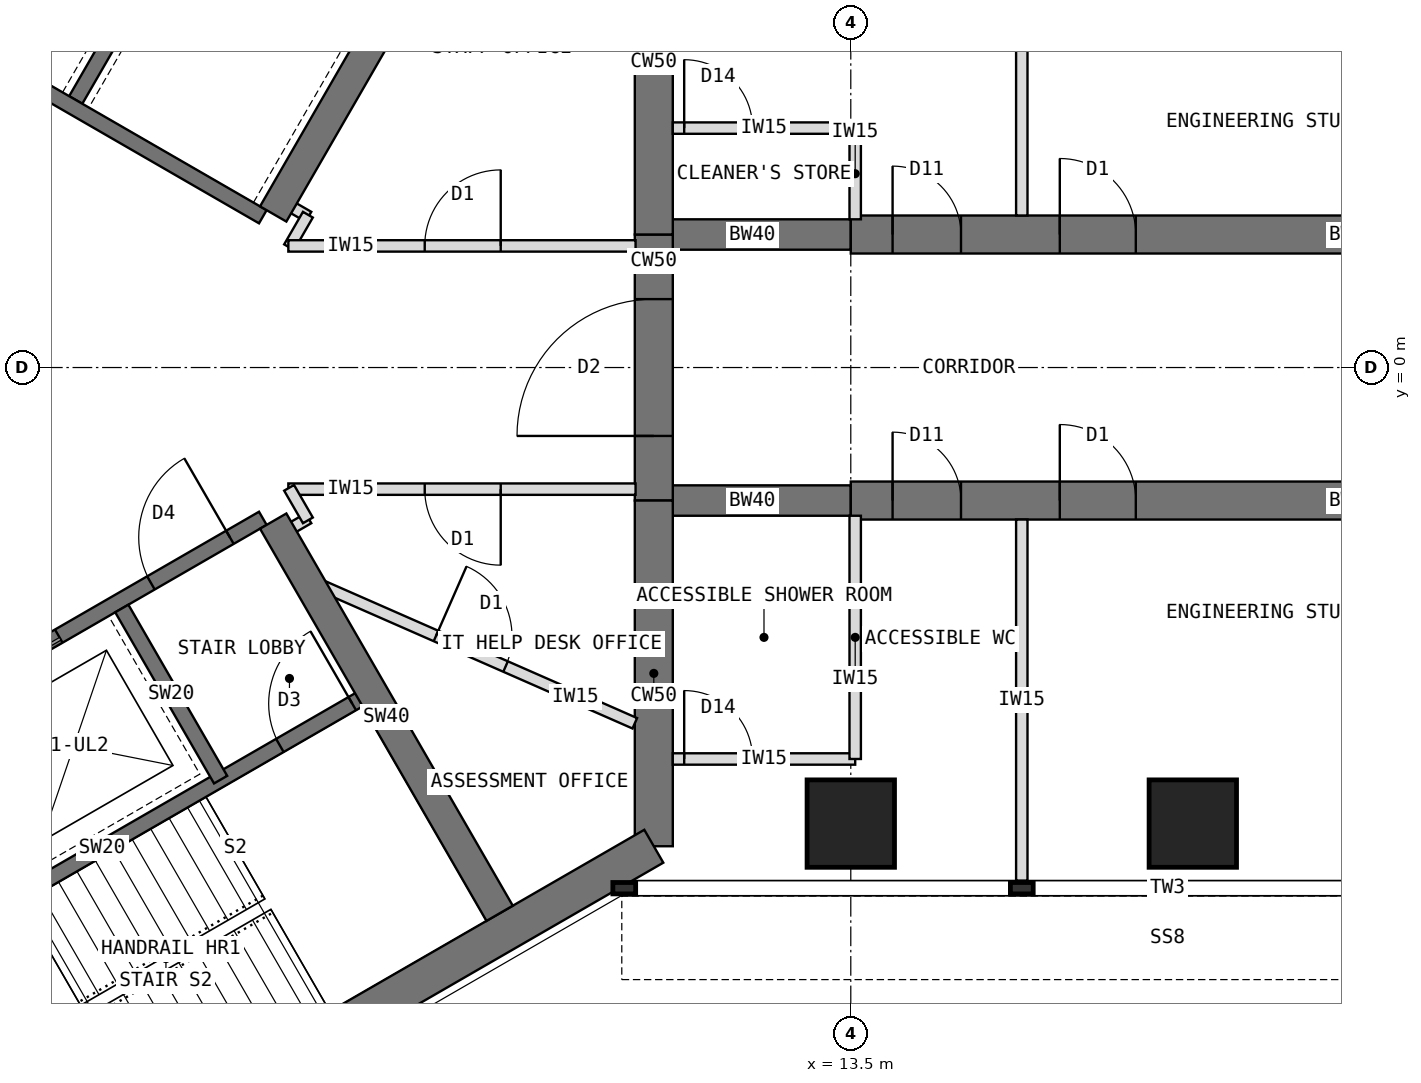
"""IFC4 building model, lengths in metres.
Left out: names, types, materials, properties, quantities, classifications, styles, units other than length and angle.
Written with IfcOpenShell. Run it as: python <this file> out.ifc"""

import sys

from ifc_helpers import new_model, si_unit, direction, frame, frame_2d, origin, origin_2d, place, context, subcontext, project, spatial, rectangle, extrude, element, fill, save


model = new_model("IFC4")
c1 = context("Model", 3, precision=1e-05, world=origin(), true_north=direction((0.0, 1.0)))
c2 = subcontext(c1, "Body", "Model", "MODEL_VIEW")
j1 = project(units=[si_unit("LENGTHUNIT", "METRE"), si_unit("PLANEANGLEUNIT", "RADIAN")], contexts=[c1])
p1 = place(None, origin())
s1 = spatial("IfcSite", under=j1, at=p1, CompositionType="ELEMENT")
p2 = place(p1, origin())
s2 = spatial("IfcBuilding", under=s1, at=p2, CompositionType="ELEMENT")
p3 = place(p2, frame((0.0, 0.0, 194.5)))
s3 = spatial("IfcBuildingStorey", under=s2, at=p3, CompositionType="ELEMENT", Elevation=194.5)
p4 = place(p3, frame((10.908, -6.298, 0.0), z_axis=(0.0, 0.0, 1.0), x_axis=(0.0, 1.0, 0.0)))
e1 = element("IfcWall", 1, at=p4, inside=s3, PredefinedType="SHEAR", context=c2, shape_type="SweptSolid", body=[
    extrude(rectangle(XDim=4.548, YDim=0.5, at=frame_2d((2.274, 0.0))), origin(), (0.0, 0.0, 1.0), 4.0),
])
p5 = place(p3, frame((10.908, -1.75, 0.0), z_axis=(0.0, 0.0, 1.0), x_axis=(0.0, 1.0, 0.0)))
e2 = element("IfcWall", 2, at=p5, inside=s3, PredefinedType="SHEAR", context=c2, shape_type="SweptSolid", body=[
    extrude(rectangle(XDim=3.5, YDim=0.5, at=frame_2d((1.75, 0.0))), origin(), (0.0, 0.0, 1.0), 4.0),
])
p6 = place(p5, frame((0.85, 0.0, 0.0)))
e3 = element("IfcOpeningElement", 3, at=p6, cuts=e2, PredefinedType="OPENING", context=c2, shape_type="SweptSolid", body=[
    extrude(rectangle(XDim=1.8, YDim=2.1, at=frame_2d((0.9, 1.05))), frame((0.0, 0.26, 0.0), z_axis=(0.0, -1.0, 0.0), x_axis=(1.0, 0.0, 0.0)), (0.0, 0.0, 1.0), 0.52),
])
p7 = place(p3, frame((10.908, 1.75, 0.0), z_axis=(0.0, 0.0, 1.0), x_axis=(0.0, 1.0, 0.0)))
e4 = element("IfcWall", 4, at=p7, inside=s3, PredefinedType="SHEAR", context=c2, shape_type="SweptSolid", body=[
    extrude(rectangle(XDim=4.548, YDim=0.5, at=frame_2d((2.274, 0.0))), origin(), (0.0, 0.0, 1.0), 4.0),
])
p8 = place(p3, frame((0.0, -12.596, 0.0), z_axis=(0.0, 0.0, 1.0), x_axis=(0.866021940709, 0.500005998175, 0.0)))
e5 = element("IfcWall", 5, at=p8, inside=s3, PredefinedType="SHEAR", context=c2, shape_type="SweptSolid", body=[
    extrude(rectangle(XDim=12.596, YDim=0.5, at=frame_2d((6.298, 0.0))), origin(), (0.0, 0.0, 1.0), 4.0),
])
p9 = place(p3, frame((10.908, 1.75, 0.0), z_axis=(0.0, 0.0, 1.0), x_axis=(1.0, 0.0, 0.0)))
e6 = element("IfcWall", 6, at=p9, inside=s3, PredefinedType="SHEAR", context=c2, shape_type="SweptSolid", body=[
    extrude(rectangle(XDim=2.592, YDim=0.4, at=frame_2d((1.296, 0.0))), origin(), (0.0, 0.0, 1.0), 4.0),
])
p10 = place(p3, frame((13.5, 1.75, 0.0), z_axis=(0.0, 0.0, 1.0), x_axis=(1.0, 0.0, 0.0)))
e7 = element("IfcWall", 7, at=p10, inside=s3, PredefinedType="SHEAR", context=c2, shape_type="SweptSolid", body=[
    extrude(rectangle(XDim=13.2, YDim=0.5, at=frame_2d((6.6, 0.0))), origin(), (0.0, 0.0, 1.0), 4.0),
])
p11 = place(p10, frame((0.55, 0.0, 0.0)))
e8 = element("IfcOpeningElement", 8, at=p11, cuts=e7, PredefinedType="OPENING", context=c2, shape_type="SweptSolid", body=[
    extrude(rectangle(XDim=0.9, YDim=2.1, at=frame_2d((0.45, 1.05))), frame((0.0, 0.26, 0.0), z_axis=(0.0, -1.0, 0.0), x_axis=(1.0, 0.0, 0.0)), (0.0, 0.0, 1.0), 0.52),
])
p12 = place(p10, frame((2.75, 0.0, 0.0)))
e9 = element("IfcOpeningElement", 9, at=p12, cuts=e7, PredefinedType="OPENING", context=c2, shape_type="SweptSolid", body=[
    extrude(rectangle(XDim=1.0, YDim=2.1, at=frame_2d((0.5, 1.05))), frame((0.0, 0.26, 0.0), z_axis=(0.0, -1.0, 0.0), x_axis=(1.0, 0.0, 0.0)), (0.0, 0.0, 1.0), 0.52),
])
p13 = place(p3, frame((10.908, -1.75, 0.0), z_axis=(0.0, 0.0, 1.0), x_axis=(1.0, 0.0, 0.0)))
e10 = element("IfcWall", 10, at=p13, inside=s3, PredefinedType="SHEAR", context=c2, shape_type="SweptSolid", body=[
    extrude(rectangle(XDim=2.592, YDim=0.4, at=frame_2d((1.296, 0.0))), origin(), (0.0, 0.0, 1.0), 4.0),
])
p14 = place(p3, frame((13.5, -1.75, 0.0), z_axis=(0.0, 0.0, 1.0), x_axis=(1.0, 0.0, 0.0)))
e11 = element("IfcWall", 11, at=p14, inside=s3, PredefinedType="SHEAR", context=c2, shape_type="SweptSolid", body=[
    extrude(rectangle(XDim=13.2, YDim=0.5, at=frame_2d((6.6, 0.0))), origin(), (0.0, 0.0, 1.0), 4.0),
])
p15 = place(p14, frame((0.55, 0.0, 0.0)))
e12 = element("IfcOpeningElement", 12, at=p15, cuts=e11, PredefinedType="OPENING", context=c2, shape_type="SweptSolid", body=[
    extrude(rectangle(XDim=0.9, YDim=2.1, at=frame_2d((0.45, 1.05))), frame((0.0, 0.26, 0.0), z_axis=(0.0, -1.0, 0.0), x_axis=(1.0, 0.0, 0.0)), (0.0, 0.0, 1.0), 0.52),
])
p16 = place(p14, frame((2.75, 0.0, 0.0)))
e13 = element("IfcOpeningElement", 13, at=p16, cuts=e11, PredefinedType="OPENING", context=c2, shape_type="SweptSolid", body=[
    extrude(rectangle(XDim=1.0, YDim=2.1, at=frame_2d((0.5, 1.05))), frame((0.0, 0.26, 0.0), z_axis=(0.0, -1.0, 0.0), x_axis=(1.0, 0.0, 0.0)), (0.0, 0.0, 1.0), 0.52),
])
for number, where, z_axis, x_axis in (
    (14, (13.5, -6.0, 0.0), (0.0, 0.0, 1.0), (1.0, 0.0, 0.0)),
    (15, (18.0, -6.0, 0.0), (0.0, 0.0, 1.0), (1.0, 0.0, 0.0)),
):
    element("IfcColumn", number, at=place(p3, frame(where, z_axis=z_axis, x_axis=x_axis)), inside=s3, PredefinedType="COLUMN", context=c2, shape_type="SweptSolid", body=[
        extrude(rectangle(XDim=1.15, YDim=1.15, at=origin_2d()), origin(), (0.0, 0.0, 1.0), 4.0),
    ])
p17 = place(p3, frame((5.764, 1.984, 0.0), z_axis=(0.0, 0.0, 1.0), x_axis=(-0.866026010844, 0.49999894854, 0.0)))
e16 = element("IfcWall", 16, at=p17, inside=s3, PredefinedType="SHEAR", context=c2, shape_type="SweptSolid", body=[
    extrude(rectangle(XDim=8.0, YDim=0.2, at=frame_2d((4.0, 0.0))), origin(), (0.0, 0.0, 1.0), 4.0),
])
p18 = place(p17, frame((6.3, 0.0, 0.0)))
e17 = element("IfcOpeningElement", 17, at=p18, cuts=e16, PredefinedType="OPENING", context=c2, shape_type="SweptSolid", body=[
    extrude(rectangle(XDim=1.2, YDim=2.1, at=frame_2d((0.6, 1.05))), frame((0.0, 0.11, 0.0), z_axis=(0.0, -1.0, 0.0), x_axis=(1.0, 0.0, 0.0)), (0.0, 0.0, 1.0), 0.22),
])
p19 = place(p3, frame((3.303, 3.52, 0.0), z_axis=(0.0, 0.0, 1.0), x_axis=(0.499936506574, 0.866062058628, 0.0)))
e18 = element("IfcWall", 18, at=p19, inside=s3, PredefinedType="SHEAR", context=c2, shape_type="SweptSolid", body=[
    extrude(rectangle(XDim=2.6, YDim=0.2, at=frame_2d((1.3, 0.0))), origin(), (0.0, 0.0, 1.0), 4.0),
])
p20 = place(p3, frame((5.901, 2.02, 0.0), z_axis=(0.0, 0.0, 1.0), x_axis=(0.500003832394, 0.86602319114, 0.0)))
e19 = element("IfcWall", 19, at=p20, inside=s3, PredefinedType="SHEAR", context=c2, shape_type="SweptSolid", body=[
    extrude(rectangle(XDim=5.958, YDim=0.4, at=frame_2d((2.979, 0.0))), origin(), (0.0, 0.0, 1.0), 4.0),
])
p21 = place(p3, frame((-1.164, -5.984, 0.0), z_axis=(0.0, 0.0, 1.0), x_axis=(0.866026010844, 0.49999894854, 0.0)))
e20 = element("IfcWall", 20, at=p21, inside=s3, PredefinedType="SHEAR", context=c2, shape_type="SweptSolid", body=[
    extrude(rectangle(XDim=8.0, YDim=0.2, at=frame_2d((4.0, 0.0))), origin(), (0.0, 0.0, 1.0), 4.0),
])
p22 = place(p21, frame((6.3, 0.0, 0.0)))
e21 = element("IfcOpeningElement", 21, at=p22, cuts=e20, PredefinedType="OPENING", context=c2, shape_type="SweptSolid", body=[
    extrude(rectangle(XDim=1.2, YDim=2.1, at=frame_2d((0.6, 1.05))), frame((0.0, 0.11, 0.0), z_axis=(0.0, -1.0, 0.0), x_axis=(1.0, 0.0, 0.0)), (0.0, 0.0, 1.0), 0.22),
])
p23 = place(p21, frame((0.9, 0.0, 0.0)))
e22 = element("IfcOpeningElement", 22, at=p23, cuts=e20, PredefinedType="OPENING", context=c2, shape_type="SweptSolid", body=[
    extrude(rectangle(XDim=1.1, YDim=2.2, at=frame_2d((0.55, 1.1))), frame((0.0, 0.11, 0.0), z_axis=(0.0, -1.0, 0.0), x_axis=(1.0, 0.0, 0.0)), (0.0, 0.0, 1.0), 0.22),
])
p24 = place(p21, frame((3.8, 0.0, 0.0)))
e23 = element("IfcOpeningElement", 23, at=p24, cuts=e20, PredefinedType="OPENING", context=c2, shape_type="SweptSolid", body=[
    extrude(rectangle(XDim=1.1, YDim=2.2, at=frame_2d((0.55, 1.1))), frame((0.0, 0.11, 0.0), z_axis=(0.0, -1.0, 0.0), x_axis=(1.0, 0.0, 0.0)), (0.0, 0.0, 1.0), 0.22),
])
p25 = place(p3, frame((3.909, -3.17, 0.0), z_axis=(0.0, 0.0, 1.0), x_axis=(0.49997716683, -0.86603858612, 0.0)))
e24 = element("IfcWall", 24, at=p25, inside=s3, PredefinedType="SHEAR", context=c2, shape_type="SweptSolid", body=[
    extrude(rectangle(XDim=2.6, YDim=0.2, at=frame_2d((1.3, 0.0))), origin(), (0.0, 0.0, 1.0), 4.0),
])
p26 = place(p3, frame((0.186, -8.322, 0.0), z_axis=(0.0, 0.0, 1.0), x_axis=(0.866026010844, 0.49999894854, 0.0)))
e25 = element("IfcWall", 25, at=p26, inside=s3, PredefinedType="SHEAR", context=c2, shape_type="SweptSolid", body=[
    extrude(rectangle(XDim=8.0, YDim=0.2, at=frame_2d((4.0, 0.0))), origin(), (0.0, 0.0, 1.0), 4.0),
])
p27 = place(p26, frame((6.7, 0.0, 0.0)))
e26 = element("IfcOpeningElement", 26, at=p27, cuts=e25, PredefinedType="OPENING", context=c2, shape_type="SweptSolid", body=[
    extrude(rectangle(XDim=1.1, YDim=2.1, at=frame_2d((0.55, 1.05))), frame((0.0, 0.11, 0.0), z_axis=(0.0, -1.0, 0.0), x_axis=(1.0, 0.0, 0.0)), (0.0, 0.0, 1.0), 0.22),
])
p28 = place(p3, frame((5.901, -2.02, 0.0), z_axis=(0.0, 0.0, 1.0), x_axis=(0.500003832394, -0.86602319114, 0.0)))
e27 = element("IfcWall", 27, at=p28, inside=s3, PredefinedType="SHEAR", context=c2, shape_type="SweptSolid", body=[
    extrude(rectangle(XDim=5.958, YDim=0.4, at=frame_2d((2.979, 0.0))), origin(), (0.0, 0.0, 1.0), 4.0),
])
p29 = place(p3, frame((15.75, 2.0, 0.0), z_axis=(0.0, 0.0, 1.0), x_axis=(0.0, 1.0, 0.0)))
e28 = element("IfcWall", 28, at=p29, inside=s3, PredefinedType="PARTITIONING", context=c2, shape_type="SweptSolid", body=[
    extrude(rectangle(XDim=4.75, YDim=0.15, at=frame_2d((2.375, 0.0))), origin(), (0.0, 0.0, 1.0), 3.8),
])
p30 = place(p3, frame((11.158, 3.15, 0.0), z_axis=(0.0, 0.0, 1.0), x_axis=(1.0, 0.0, 0.0)))
e29 = element("IfcWall", 29, at=p30, inside=s3, PredefinedType="PARTITIONING", context=c2, shape_type="SweptSolid", body=[
    extrude(rectangle(XDim=2.4, YDim=0.15, at=frame_2d((1.2, 0.0))), origin(), (0.0, 0.0, 1.0), 3.8),
])
p31 = place(p30, frame((0.15, 0.0, 0.0)))
e30 = element("IfcOpeningElement", 30, at=p31, cuts=e29, PredefinedType="OPENING", context=c2, shape_type="SweptSolid", body=[
    extrude(rectangle(XDim=0.9, YDim=2.1, at=frame_2d((0.45, 1.05))), frame((0.0, 0.085, 0.0), z_axis=(0.0, -1.0, 0.0), x_axis=(1.0, 0.0, 0.0)), (0.0, 0.0, 1.0), 0.17),
])
p32 = place(p3, frame((13.558, 1.95, 0.0), z_axis=(0.0, 0.0, 1.0), x_axis=(0.0, 1.0, 0.0)))
e31 = element("IfcWall", 31, at=p32, inside=s3, PredefinedType="PARTITIONING", context=c2, shape_type="SweptSolid", body=[
    extrude(rectangle(XDim=1.2, YDim=0.15, at=frame_2d((0.6, 0.0))), origin(), (0.0, 0.0, 1.0), 3.267),
])
p33 = place(p3, frame((15.75, -2.0, 0.0), z_axis=(0.0, 0.0, 1.0), x_axis=(0.0, -1.0, 0.0)))
e32 = element("IfcWall", 32, at=p33, inside=s3, PredefinedType="PARTITIONING", context=c2, shape_type="SweptSolid", body=[
    extrude(rectangle(XDim=4.75, YDim=0.15, at=frame_2d((2.375, 0.0))), origin(), (0.0, 0.0, 1.0), 3.8),
])
p34 = place(p3, frame((11.158, -5.15, 0.0), z_axis=(0.0, 0.0, 1.0), x_axis=(1.0, 0.0, 0.0)))
e33 = element("IfcWall", 33, at=p34, inside=s3, PredefinedType="PARTITIONING", context=c2, shape_type="SweptSolid", body=[
    extrude(rectangle(XDim=2.4, YDim=0.15, at=frame_2d((1.2, 0.0))), origin(), (0.0, 0.0, 1.0), 3.8),
])
p35 = place(p34, frame((0.15, 0.0, 0.0)))
e34 = element("IfcOpeningElement", 34, at=p35, cuts=e33, PredefinedType="OPENING", context=c2, shape_type="SweptSolid", body=[
    extrude(rectangle(XDim=0.9, YDim=2.1, at=frame_2d((0.45, 1.05))), frame((0.0, 0.085, 0.0), z_axis=(0.0, -1.0, 0.0), x_axis=(1.0, 0.0, 0.0)), (0.0, 0.0, 1.0), 0.17),
])
p36 = place(p3, frame((13.558, -1.95, 0.0), z_axis=(0.0, 0.0, 1.0), x_axis=(0.0, -1.0, 0.0)))
e35 = element("IfcWall", 35, at=p36, inside=s3, PredefinedType="PARTITIONING", context=c2, shape_type="SweptSolid", body=[
    extrude(rectangle(XDim=3.2, YDim=0.15, at=frame_2d((1.6, 0.0))), origin(), (0.0, 0.0, 1.0), 3.267),
])
for number, where, z_axis, x_axis in (
    (36, (6.365, -1.983, 0.0), (0.0, 0.0, 1.0), (-0.866, -0.5, 0.0)),
    (37, (5.992, 2.198, 0.0), (0.0, 0.0, 1.0), (0.866, -0.5, 0.0)),
):
    element("IfcWall", number, at=place(p3, frame(where, z_axis=z_axis, x_axis=x_axis)), inside=s3, PredefinedType="PARTITIONING", context=c2, shape_type="SweptSolid", body=[
        extrude(rectangle(XDim=0.43, YDim=0.15, at=frame_2d((0.215, 0.0))), origin(), (0.0, 0.0, 1.0), 3.8),
    ])
p37 = place(p3, frame((6.357, 2.011, 0.0), z_axis=(0.0, 0.0, 1.0), x_axis=(-0.50033519877, -0.865831790172, 0.0)))
e38 = element("IfcWall", 38, at=p37, inside=s3, PredefinedType="PARTITIONING", context=c2, shape_type="SweptSolid", body=[
    extrude(rectangle(XDim=0.494, YDim=0.15, at=frame_2d((0.247, 0.0))), origin(), (0.0, 0.0, 1.0), 3.8),
])
p38 = place(p3, frame((6.1, 1.6, 0.0), z_axis=(0.0, 0.0, 1.0), x_axis=(1.0, 0.0, 0.0)))
e39 = element("IfcWall", 39, at=p38, inside=s3, PredefinedType="PARTITIONING", context=c2, shape_type="SweptSolid", body=[
    extrude(rectangle(XDim=4.568, YDim=0.15, at=frame_2d((2.284, 0.0))), origin(), (0.0, 0.0, 1.0), 3.8),
])
p39 = place(p38, frame((1.794, 0.0, 0.0)))
e40 = element("IfcOpeningElement", 40, at=p39, cuts=e39, PredefinedType="OPENING", context=c2, shape_type="SweptSolid", body=[
    extrude(rectangle(XDim=1.0, YDim=2.1, at=frame_2d((0.5, 1.05))), frame((0.0, 0.085, 0.0), z_axis=(0.0, -1.0, 0.0), x_axis=(1.0, 0.0, 0.0)), (0.0, 0.0, 1.0), 0.17),
])
p40 = place(p3, frame((10.668, -1.6, 0.0), z_axis=(0.0, 0.0, 1.0), x_axis=(-1.0, 0.0, 0.0)))
e41 = element("IfcWall", 41, at=p40, inside=s3, PredefinedType="PARTITIONING", context=c2, shape_type="SweptSolid", body=[
    extrude(rectangle(XDim=4.568, YDim=0.15, at=frame_2d((2.284, 0.0))), origin(), (0.0, 0.0, 1.0), 3.8),
])
p41 = place(p40, frame((1.774, 0.0, 0.0)))
e42 = element("IfcOpeningElement", 42, at=p41, cuts=e41, PredefinedType="OPENING", context=c2, shape_type="SweptSolid", body=[
    extrude(rectangle(XDim=1.0, YDim=2.1, at=frame_2d((0.5, 1.05))), frame((0.0, 0.085, 0.0), z_axis=(0.0, -1.0, 0.0), x_axis=(1.0, 0.0, 0.0)), (0.0, 0.0, 1.0), 0.17),
])
p42 = place(p3, frame((6.11, -1.583, 0.0), z_axis=(0.0, 0.0, 1.0), x_axis=(0.50033519877, -0.865831790172, 0.0)))
e43 = element("IfcWall", 43, at=p42, inside=s3, PredefinedType="PARTITIONING", context=c2, shape_type="SweptSolid", body=[
    extrude(rectangle(XDim=0.494, YDim=0.15, at=frame_2d((0.247, 0.0))), origin(), (0.0, 0.0, 1.0), 3.8),
])
p43 = place(p3, frame((6.342, -2.785, 0.0), z_axis=(0.0, 0.0, 1.0), x_axis=(0.915607292951, -0.402073730919, 0.0)))
e44 = element("IfcWall", 44, at=p43, inside=s3, PredefinedType="PARTITIONING", context=c2, shape_type="SweptSolid", body=[
    extrude(rectangle(XDim=4.714, YDim=0.15, at=frame_2d((2.357, 0.0))), origin(), (0.0, 0.0, 1.0), 3.8),
])
p44 = place(p43, frame((1.857, 0.0, 0.0)))
e45 = element("IfcOpeningElement", 45, at=p44, cuts=e44, PredefinedType="OPENING", context=c2, shape_type="SweptSolid", body=[
    extrude(rectangle(XDim=1.0, YDim=2.1, at=frame_2d((0.5, 1.05))), frame((0.0, 0.085, 0.0), z_axis=(0.0, -1.0, 0.0), x_axis=(1.0, 0.0, 0.0)), (0.0, 0.0, 1.0), 0.17),
])
p45 = place(p22, origin())
e46 = element("IfcDoor", 46, at=p45, inside=s3, OperationType="SINGLE_SWING_RIGHT", PredefinedType="DOOR", context=c2, shape_type="SweptSolid", body=[
    extrude(rectangle(XDim=1.2, YDim=2.1, at=frame_2d((0.6, 1.05))), frame((0.0, 0.025, 0.0), z_axis=(0.0, -1.0, 0.0), x_axis=(1.0, 0.0, 0.0)), (0.0, 0.0, 1.0), 0.05),
])
fill(e21, e46)
p46 = place(p24, origin())
e47 = element("IfcDoor", 47, at=p46, inside=s3, OperationType="DOUBLE_DOOR_SLIDING", PredefinedType="DOOR", context=c2, shape_type="SweptSolid", body=[
    extrude(rectangle(XDim=1.1, YDim=2.2, at=frame_2d((0.55, 1.1))), frame((0.0, 0.025, 0.0), z_axis=(0.0, -1.0, 0.0), x_axis=(1.0, 0.0, 0.0)), (0.0, 0.0, 1.0), 0.05),
])
fill(e23, e47)
p47 = place(p27, origin())
e48 = element("IfcDoor", 48, at=p47, inside=s3, OperationType="SINGLE_SWING_RIGHT", PredefinedType="DOOR", context=c2, shape_type="SweptSolid", body=[
    extrude(rectangle(XDim=1.1, YDim=2.1, at=frame_2d((0.55, 1.05))), frame((0.0, 0.025, 0.0), z_axis=(0.0, -1.0, 0.0), x_axis=(1.0, 0.0, 0.0)), (0.0, 0.0, 1.0), 0.05),
])
fill(e26, e48)
p48 = place(p6, origin())
e49 = element("IfcDoor", 49, at=p48, inside=s3, OperationType="DOUBLE_DOOR_DOUBLE_SWING", PredefinedType="DOOR", context=c2, shape_type="SweptSolid", body=[
    extrude(rectangle(XDim=1.8, YDim=2.1, at=frame_2d((0.9, 1.05))), frame((0.0, 0.025, 0.0), z_axis=(0.0, -1.0, 0.0), x_axis=(1.0, 0.0, 0.0)), (0.0, 0.0, 1.0), 0.05),
])
fill(e3, e49)
p49 = place(p31, origin())
e50 = element("IfcDoor", 50, at=p49, inside=s3, OperationType="SINGLE_SWING_LEFT", PredefinedType="DOOR", context=c2, shape_type="SweptSolid", body=[
    extrude(rectangle(XDim=0.9, YDim=2.1, at=frame_2d((0.45, 1.05))), frame((0.0, 0.025, 0.0), z_axis=(0.0, -1.0, 0.0), x_axis=(1.0, 0.0, 0.0)), (0.0, 0.0, 1.0), 0.05),
])
fill(e30, e50)
p50 = place(p35, origin())
e51 = element("IfcDoor", 51, at=p50, inside=s3, OperationType="SINGLE_SWING_LEFT", PredefinedType="DOOR", context=c2, shape_type="SweptSolid", body=[
    extrude(rectangle(XDim=0.9, YDim=2.1, at=frame_2d((0.45, 1.05))), frame((0.0, 0.025, 0.0), z_axis=(0.0, -1.0, 0.0), x_axis=(1.0, 0.0, 0.0)), (0.0, 0.0, 1.0), 0.05),
])
fill(e34, e51)
p51 = place(p41, origin())
e52 = element("IfcDoor", 52, at=p51, inside=s3, OperationType="SINGLE_SWING_LEFT", PredefinedType="DOOR", context=c2, shape_type="SweptSolid", body=[
    extrude(rectangle(XDim=1.0, YDim=2.1, at=frame_2d((0.5, 1.05))), frame((0.0, 0.025, 0.0), z_axis=(0.0, -1.0, 0.0), x_axis=(1.0, 0.0, 0.0)), (0.0, 0.0, 1.0), 0.05),
])
fill(e42, e52)
p52 = place(p44, origin())
e53 = element("IfcDoor", 53, at=p52, inside=s3, OperationType="SINGLE_SWING_LEFT", PredefinedType="DOOR", context=c2, shape_type="SweptSolid", body=[
    extrude(rectangle(XDim=1.0, YDim=2.1, at=frame_2d((0.5, 1.05))), frame((0.0, 0.025, 0.0), z_axis=(0.0, -1.0, 0.0), x_axis=(1.0, 0.0, 0.0)), (0.0, 0.0, 1.0), 0.05),
])
fill(e45, e53)
p53 = place(p39, origin())
e54 = element("IfcDoor", 54, at=p53, inside=s3, OperationType="SINGLE_SWING_RIGHT", PredefinedType="DOOR", context=c2, shape_type="SweptSolid", body=[
    extrude(rectangle(XDim=1.0, YDim=2.1, at=frame_2d((0.5, 1.05))), frame((0.0, 0.025, 0.0), z_axis=(0.0, -1.0, 0.0), x_axis=(1.0, 0.0, 0.0)), (0.0, 0.0, 1.0), 0.05),
])
fill(e40, e54)
p54 = place(p11, origin())
e55 = element("IfcDoor", 55, at=p54, inside=s3, OperationType="SINGLE_SWING_LEFT", PredefinedType="DOOR", context=c2, shape_type="SweptSolid", body=[
    extrude(rectangle(XDim=0.9, YDim=2.1, at=frame_2d((0.45, 1.05))), frame((0.0, 0.025, 0.0), z_axis=(0.0, -1.0, 0.0), x_axis=(1.0, 0.0, 0.0)), (0.0, 0.0, 1.0), 0.05),
])
fill(e8, e55)
p55 = place(p12, origin())
e56 = element("IfcDoor", 56, at=p55, inside=s3, OperationType="SINGLE_SWING_LEFT", PredefinedType="DOOR", context=c2, shape_type="SweptSolid", body=[
    extrude(rectangle(XDim=1.0, YDim=2.1, at=frame_2d((0.5, 1.05))), frame((0.0, 0.025, 0.0), z_axis=(0.0, -1.0, 0.0), x_axis=(1.0, 0.0, 0.0)), (0.0, 0.0, 1.0), 0.05),
])
fill(e9, e56)
p56 = place(p15, origin())
e57 = element("IfcDoor", 57, at=p56, inside=s3, OperationType="SINGLE_SWING_LEFT", PredefinedType="DOOR", context=c2, shape_type="SweptSolid", body=[
    extrude(rectangle(XDim=0.9, YDim=2.1, at=frame_2d((0.45, 1.05))), frame((0.0, 0.025, 0.0), z_axis=(0.0, -1.0, 0.0), x_axis=(1.0, 0.0, 0.0)), (0.0, 0.0, 1.0), 0.05),
])
fill(e12, e57)
p57 = place(p16, origin())
e58 = element("IfcDoor", 58, at=p57, inside=s3, OperationType="SINGLE_SWING_LEFT", PredefinedType="DOOR", context=c2, shape_type="SweptSolid", body=[
    extrude(rectangle(XDim=1.0, YDim=2.1, at=frame_2d((0.5, 1.05))), frame((0.0, 0.025, 0.0), z_axis=(0.0, -1.0, 0.0), x_axis=(1.0, 0.0, 0.0)), (0.0, 0.0, 1.0), 0.05),
])
fill(e13, e58)
save(model, sys.argv[1])
